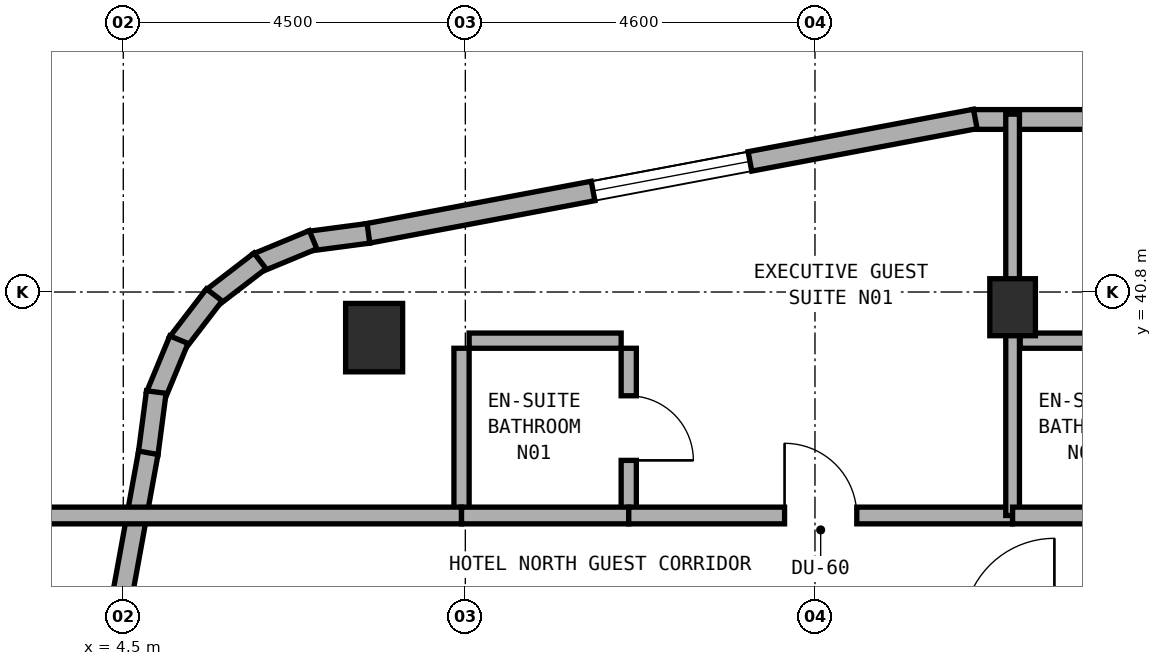
"""IFC4 building model, lengths in metres.
Left out: names, types, materials, properties, quantities, classifications, styles, units other than length and angle.
Written with IfcOpenShell. Run it as: python <this file> out.ifc"""

import sys

from ifc_helpers import new_model, si_unit, direction, frame, frame_2d, origin, origin_2d, place, context, subcontext, project, spatial, rectangle, extrude, element, fill, save


model = new_model("IFC4")
c1 = context("Model", 3, precision=1e-05, world=origin(), true_north=direction((0.0, 1.0)))
c2 = subcontext(c1, "Body", "Model", "MODEL_VIEW")
j1 = project(units=[si_unit("LENGTHUNIT", "METRE"), si_unit("PLANEANGLEUNIT", "RADIAN")], contexts=[c1])
p1 = place(None, origin())
s1 = spatial("IfcSite", under=j1, at=p1, CompositionType="ELEMENT")
p2 = place(p1, origin())
s2 = spatial("IfcBuilding", under=s1, at=p2, CompositionType="ELEMENT")
p3 = place(p2, frame((0.0, 0.0, 254.0)))
s3 = spatial("IfcBuildingStorey", under=s2, at=p3, CompositionType="ELEMENT", Elevation=254.0)
p4 = place(p3, frame((16.2, 40.6, 0.0), z_axis=(0.0, 0.0, 1.0), x_axis=(1.0, 0.0, 0.0)))
e1 = element("IfcColumn", 1, at=p4, inside=s3, PredefinedType="COLUMN", context=c2, shape_type="SweptSolid", body=[
    extrude(rectangle(XDim=0.6, YDim=0.75, at=origin_2d()), origin(), (0.0, 0.0, 1.0), 3.6),
])
p5 = place(p3, frame((7.8, 40.2, 0.0), z_axis=(0.0, 0.0, 1.0), x_axis=(1.0, 0.0, 0.0)))
e2 = element("IfcColumn", 2, at=p5, inside=s3, PredefinedType="COLUMN", context=c2, shape_type="SweptSolid", body=[
    extrude(rectangle(XDim=0.75, YDim=0.9, at=origin_2d()), origin(), (0.0, 0.0, 1.0), 3.6),
])
p6 = place(p3, frame((26.365, 43.07, 0.0), z_axis=(0.0, 0.0, 1.0), x_axis=(-1.0, 0.0, 0.0)))
e3 = element("IfcWall", 3, at=p6, inside=s3, PredefinedType="STANDARD", context=c2, shape_type="SweptSolid", body=[
    extrude(rectangle(XDim=10.695, YDim=0.26, at=frame_2d((5.348, 0.0))), origin(), (0.0, 0.0, 1.0), 3.32),
])
p7 = place(p6, frame((4.765, 0.0, 0.0)))
e4 = element("IfcOpeningElement", 4, at=p7, cuts=e3, PredefinedType="OPENING", context=c2, shape_type="SweptSolid", body=[
    extrude(rectangle(XDim=1.2, YDim=2.15, at=frame_2d((0.6, 1.075))), frame((0.0, 0.14, 0.0), z_axis=(0.0, -1.0, 0.0), x_axis=(1.0, 0.0, 0.0)), (0.0, 0.0, 1.0), 0.28),
])
p8 = place(p6, frame((1.54, 0.0, 0.85)))
e5 = element("IfcOpeningElement", 5, at=p8, cuts=e3, PredefinedType="OPENING", context=c2, shape_type="SweptSolid", body=[
    extrude(rectangle(XDim=2.1, YDim=1.5, at=frame_2d((1.05, 0.75))), frame((0.0, 0.14, 0.0), z_axis=(0.0, -1.0, 0.0), x_axis=(1.0, 0.0, 0.0)), (0.0, 0.0, 1.0), 0.28),
])
p9 = place(p6, frame((7.09, 0.0, 0.85)))
e6 = element("IfcOpeningElement", 6, at=p9, cuts=e3, PredefinedType="OPENING", context=c2, shape_type="SweptSolid", body=[
    extrude(rectangle(XDim=2.1, YDim=1.5, at=frame_2d((1.05, 0.75))), frame((0.0, 0.14, 0.0), z_axis=(0.0, -1.0, 0.0), x_axis=(1.0, 0.0, 0.0)), (0.0, 0.0, 1.0), 0.28),
])
p10 = place(p3, frame((15.709, 43.077, 0.0), z_axis=(0.0, 0.0, 1.0), x_axis=(-0.982711765767, -0.185142068214, 0.0)))
e7 = element("IfcWall", 7, at=p10, inside=s3, PredefinedType="STANDARD", context=c2, shape_type="SweptSolid", body=[
    extrude(rectangle(XDim=8.134, YDim=0.26, at=frame_2d((4.067, 0.0))), origin(), (0.0, 0.0, 1.0), 3.32),
])
p11 = place(p10, frame((3.017, 0.0, 0.85)))
e8 = element("IfcOpeningElement", 8, at=p11, cuts=e7, PredefinedType="OPENING", context=c2, shape_type="SweptSolid", body=[
    extrude(rectangle(XDim=2.1, YDim=1.5, at=frame_2d((1.05, 0.75))), frame((0.0, 0.14, 0.0), z_axis=(0.0, -1.0, 0.0), x_axis=(1.0, 0.0, 0.0)), (0.0, 0.0, 1.0), 0.28),
])
p12 = place(p3, frame((7.725, 41.572, 0.0), z_axis=(0.0, 0.0, 1.0), x_axis=(-0.991423406861, -0.130689052056, 0.0)))
e9 = element("IfcWall", 9, at=p12, inside=s3, PredefinedType="STANDARD", context=c2, shape_type="SweptSolid", body=[
    extrude(rectangle(XDim=0.781, YDim=0.26, at=frame_2d((0.39, 0.0))), origin(), (0.0, 0.0, 1.0), 3.32),
])
p13 = place(p3, frame((6.997, 41.488, 0.0), z_axis=(0.0, 0.0, 1.0), x_axis=(-0.923681457047, -0.383161279238, 0.0)))
e10 = element("IfcWall", 10, at=p13, inside=s3, PredefinedType="STANDARD", context=c2, shape_type="SweptSolid", body=[
    extrude(rectangle(XDim=0.799, YDim=0.26, at=frame_2d((0.399, 0.0))), origin(), (0.0, 0.0, 1.0), 3.32),
])
for number, where, z_axis, x_axis in (
    (11, (6.299, 41.21, 0.0), (0.0, 0.0, 1.0), (-0.793, -0.609, 0.0)),
    (12, (5.697, 40.762, 0.0), (0.0, 0.0, 1.0), (-0.609, -0.793, 0.0)),
):
    element("IfcWall", number, at=place(p3, frame(where, z_axis=z_axis, x_axis=x_axis)), inside=s3, PredefinedType="STANDARD", context=c2, shape_type="SweptSolid", body=[
        extrude(rectangle(XDim=0.798, YDim=0.26, at=frame_2d((0.399, 0.0))), origin(), (0.0, 0.0, 1.0), 3.32),
    ])
p14 = place(p3, frame((5.232, 40.173, 0.0), z_axis=(0.0, 0.0, 1.0), x_axis=(-0.382900540965, -0.923789573295, 0.0)))
e13 = element("IfcWall", 13, at=p14, inside=s3, PredefinedType="STANDARD", context=c2, shape_type="SweptSolid", body=[
    extrude(rectangle(XDim=0.799, YDim=0.26, at=frame_2d((0.399, 0.0))), origin(), (0.0, 0.0, 1.0), 3.32),
])
p15 = place(p3, frame((4.934, 39.484, 0.0), z_axis=(0.0, 0.0, 1.0), x_axis=(-0.130183552987, -0.991489910454, 0.0)))
e14 = element("IfcWall", 14, at=p15, inside=s3, PredefinedType="STANDARD", context=c2, shape_type="SweptSolid", body=[
    extrude(rectangle(XDim=0.816, YDim=0.26, at=frame_2d((0.408, 0.0))), origin(), (0.0, 0.0, 1.0), 3.32),
])
p16 = place(p3, frame((4.829, 38.685, 0.0), z_axis=(0.0, 0.0, 1.0), x_axis=(-0.179061111398, -0.983837953316, 0.0)))
e15 = element("IfcWall", 15, at=p16, inside=s3, PredefinedType="STANDARD", context=c2, shape_type="SweptSolid", body=[
    extrude(rectangle(XDim=8.438, YDim=0.26, at=frame_2d((4.219, 0.0))), origin(), (0.0, 0.0, 1.0), 3.32),
])
p17 = place(p16, frame((3.648, 0.0, 0.85)))
e16 = element("IfcOpeningElement", 16, at=p17, cuts=e15, PredefinedType="OPENING", context=c2, shape_type="SweptSolid", body=[
    extrude(rectangle(XDim=2.1, YDim=1.5, at=frame_2d((1.05, 0.75))), frame((0.0, 0.14, 0.0), z_axis=(0.0, -1.0, 0.0), x_axis=(1.0, 0.0, 0.0)), (0.0, 0.0, 1.0), 0.28),
])
p18 = place(p3, frame((11.15, 37.96, 0.0), z_axis=(0.0, 0.0, 1.0), x_axis=(0.0, 1.0, 0.0)))
e17 = element("IfcWall", 17, at=p18, inside=s3, PredefinedType="PLUMBINGWALL", context=c2, shape_type="SweptSolid", body=[
    extrude(rectangle(XDim=2.1, YDim=0.2, at=frame_2d((1.05, 0.0))), origin(), (0.0, 0.0, 1.0), 2.845),
])
p19 = place(p18, frame((0.625, 0.0, 0.0)))
e18 = element("IfcOpeningElement", 18, at=p19, cuts=e17, PredefinedType="OPENING", context=c2, shape_type="SweptSolid", body=[
    extrude(rectangle(XDim=0.85, YDim=2.1, at=frame_2d((0.425, 1.05))), frame((0.0, 0.11, 0.0), z_axis=(0.0, -1.0, 0.0), x_axis=(1.0, 0.0, 0.0)), (0.0, 0.0, 1.0), 0.22),
])
p20 = place(p3, frame((9.05, 40.16, 0.0), z_axis=(0.0, 0.0, 1.0), x_axis=(1.0, 0.0, 0.0)))
e19 = element("IfcWall", 19, at=p20, inside=s3, PredefinedType="PLUMBINGWALL", context=c2, shape_type="SweptSolid", body=[
    extrude(rectangle(XDim=2.0, YDim=0.2, at=frame_2d((1.0, 0.0))), origin(), (0.0, 0.0, 1.0), 3.015),
])
p21 = place(p3, frame((8.95, 37.96, 0.0), z_axis=(0.0, 0.0, 1.0), x_axis=(0.0, 1.0, 0.0)))
e20 = element("IfcWall", 20, at=p21, inside=s3, PredefinedType="PLUMBINGWALL", context=c2, shape_type="SweptSolid", body=[
    extrude(rectangle(XDim=2.1, YDim=0.2, at=frame_2d((1.05, 0.0))), origin(), (0.0, 0.0, 1.0), 2.845),
])
p22 = place(p3, frame((3.36, 37.86, 0.0), z_axis=(0.0, 0.0, 1.0), x_axis=(1.0, 0.0, 0.0)))
e21 = element("IfcWall", 21, at=p22, inside=s3, PredefinedType="SOLIDWALL", context=c2, shape_type="SweptSolid", body=[
    extrude(rectangle(XDim=5.59, YDim=0.22, at=frame_2d((2.795, 0.0))), origin(), (0.0, 0.0, 1.0), 2.745),
])
p23 = place(p3, frame((8.95, 37.86, 0.0), z_axis=(0.0, 0.0, 1.0), x_axis=(1.0, 0.0, 0.0)))
e22 = element("IfcWall", 22, at=p23, inside=s3, PredefinedType="SOLIDWALL", context=c2, shape_type="SweptSolid", body=[
    extrude(rectangle(XDim=2.2, YDim=0.22, at=frame_2d((1.1, 0.0))), origin(), (0.0, 0.0, 1.0), 3.32),
])
p24 = place(p3, frame((11.15, 37.86, 0.0), z_axis=(0.0, 0.0, 1.0), x_axis=(1.0, 0.0, 0.0)))
e23 = element("IfcWall", 23, at=p24, inside=s3, PredefinedType="SOLIDWALL", context=c2, shape_type="SweptSolid", body=[
    extrude(rectangle(XDim=5.05, YDim=0.22, at=frame_2d((2.525, 0.0))), origin(), (0.0, 0.0, 1.0), 2.745),
])
p25 = place(p24, frame((2.05, 0.0, 0.0)))
e24 = element("IfcOpeningElement", 24, at=p25, cuts=e23, PredefinedType="OPENING", context=c2, shape_type="SweptSolid", body=[
    extrude(rectangle(XDim=0.95, YDim=2.1, at=frame_2d((0.475, 1.05))), frame((0.0, 0.12, 0.0), z_axis=(0.0, -1.0, 0.0), x_axis=(1.0, 0.0, 0.0)), (0.0, 0.0, 1.0), 0.24),
])
p26 = place(p3, frame((16.2, 37.86, 0.0), z_axis=(0.0, 0.0, 1.0), x_axis=(0.0, 1.0, 0.0)))
e25 = element("IfcWall", 25, at=p26, inside=s3, PredefinedType="SOLIDWALL", context=c2, shape_type="SweptSolid", body=[
    extrude(rectangle(XDim=5.28, YDim=0.18, at=frame_2d((2.64, 0.0))), origin(), (0.0, 0.0, 1.0), 2.745),
])
p27 = place(p3, frame((16.3, 40.16, 0.0), z_axis=(0.0, 0.0, 1.0), x_axis=(1.0, 0.0, 0.0)))
e26 = element("IfcWall", 26, at=p27, inside=s3, PredefinedType="PLUMBINGWALL", context=c2, shape_type="SweptSolid", body=[
    extrude(rectangle(XDim=2.0, YDim=0.2, at=frame_2d((1.0, 0.0))), origin(), (0.0, 0.0, 1.0), 3.32),
])
p28 = place(p3, frame((16.2, 37.86, 0.0), z_axis=(0.0, 0.0, 1.0), x_axis=(1.0, 0.0, 0.0)))
e27 = element("IfcWall", 27, at=p28, inside=s3, PredefinedType="SOLIDWALL", context=c2, shape_type="SweptSolid", body=[
    extrude(rectangle(XDim=2.2, YDim=0.22, at=frame_2d((1.1, 0.0))), origin(), (0.0, 0.0, 1.0), 2.745),
])
p29 = place(p11, origin())
e28 = element("IfcWindow", 28, at=p29, inside=s3, PartitioningType="SINGLE_PANEL", PredefinedType="WINDOW", context=c2, shape_type="SweptSolid", body=[
    extrude(rectangle(XDim=2.1, YDim=1.5, at=frame_2d((1.05, 0.75))), frame((0.0, 0.03, 0.0), z_axis=(0.0, -1.0, 0.0), x_axis=(1.0, 0.0, 0.0)), (0.0, 0.0, 1.0), 0.06),
])
fill(e8, e28)
p30 = place(p19, frame((0.85, 0.0, 0.0), z_axis=(0.0, 0.0, 1.0), x_axis=(-1.0, 0.0, 0.0)))
e29 = element("IfcDoor", 29, at=p30, inside=s3, OperationType="SINGLE_SWING_RIGHT", PredefinedType="DOOR", context=c2, shape_type="SweptSolid", body=[
    extrude(rectangle(XDim=0.85, YDim=2.1, at=frame_2d((0.425, 1.05))), frame((0.0, 0.025, 0.0), z_axis=(0.0, -1.0, 0.0), x_axis=(1.0, 0.0, 0.0)), (0.0, 0.0, 1.0), 0.05),
])
fill(e18, e29)
p31 = place(p25, origin())
e30 = element("IfcDoor", 30, at=p31, inside=s3, OperationType="SINGLE_SWING_LEFT", PredefinedType="DOOR", context=c2, shape_type="SweptSolid", body=[
    extrude(rectangle(XDim=0.95, YDim=2.1, at=frame_2d((0.475, 1.05))), frame((0.0, 0.025, 0.0), z_axis=(0.0, -1.0, 0.0), x_axis=(1.0, 0.0, 0.0)), (0.0, 0.0, 1.0), 0.05),
])
fill(e24, e30)
save(model, sys.argv[1])
